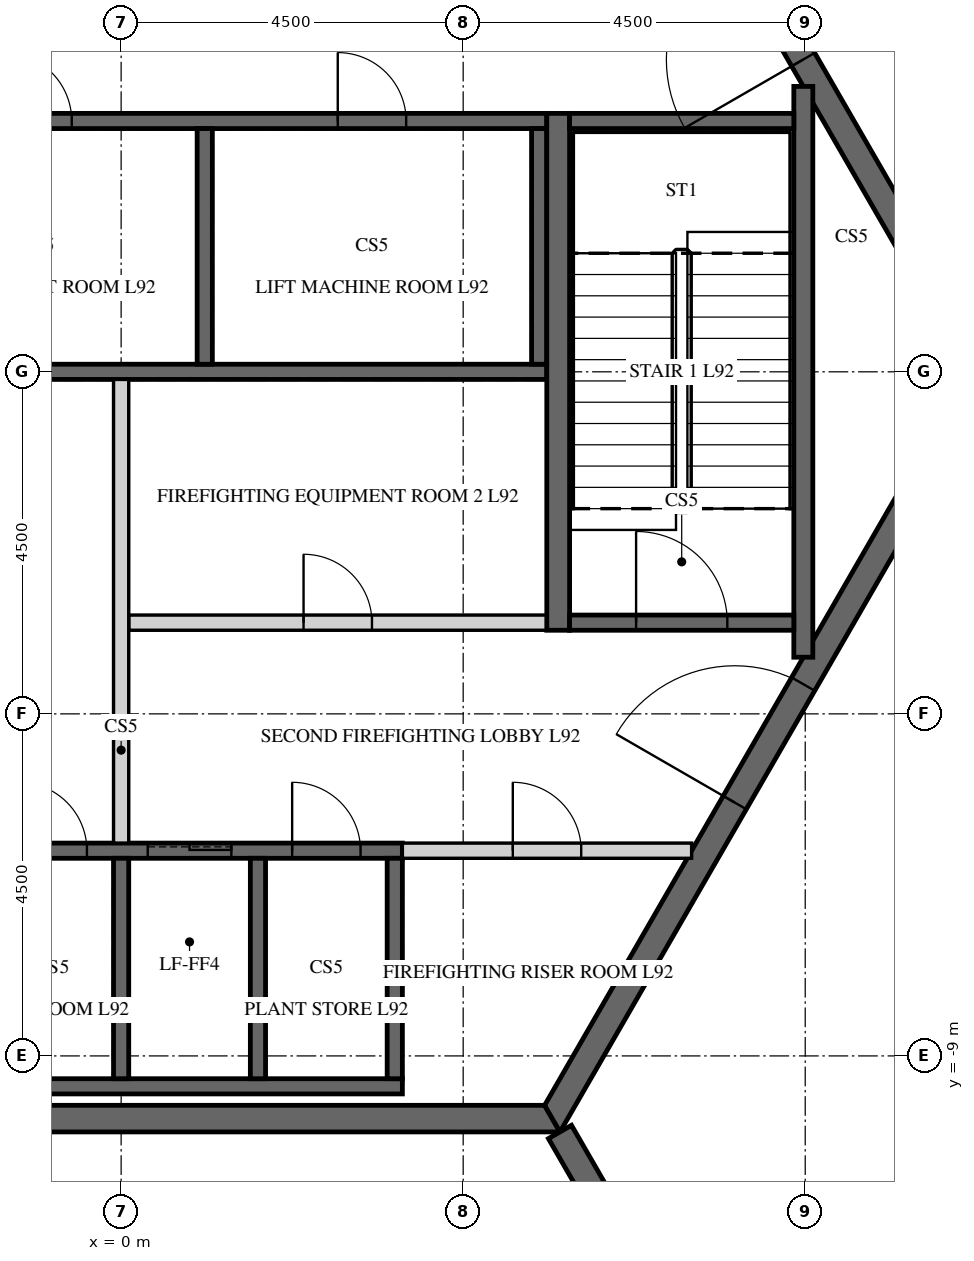
"""IFC4 building model, lengths in metres.
Left out: names, types, materials, properties, quantities, classifications, styles, units other than length and angle.
Written with IfcOpenShell. Run it as: python <this file> out.ifc"""

import sys

from ifc_helpers import new_model, si_unit, direction, frame, frame_2d, origin, place, context, subcontext, project, spatial, polyline, rectangle, outline, extrude, element, fill, save


model = new_model("IFC4")
c1 = context("Model", 3, precision=1e-05, world=origin(), true_north=direction((0.0, 1.0)))
c2 = subcontext(c1, "Body", "Model", "MODEL_VIEW")
j1 = project(units=[si_unit("LENGTHUNIT", "METRE"), si_unit("PLANEANGLEUNIT", "RADIAN")], contexts=[c1])
p1 = place(None, origin())
s1 = spatial("IfcSite", under=j1, at=p1, CompositionType="ELEMENT")
p2 = place(p1, origin())
s2 = spatial("IfcBuilding", under=s1, at=p2, CompositionType="ELEMENT")
p3 = place(p2, frame((0.0, 0.0, 388.2)))
s3 = spatial("IfcBuildingStorey", under=s2, at=p3, CompositionType="ELEMENT", Elevation=388.2)
p4 = place(p3, frame((-5.673, -9.825, -0.2), z_axis=(0.0, 0.0, 1.0), x_axis=(1.0, 0.0, 0.0)))
e1 = element("IfcWall", 1, at=p4, inside=s3, PredefinedType="SHEAR", context=c2, shape_type="SweptSolid", body=[
    extrude(outline(polyline([(-0.101, -0.175), (11.446, -0.175), (11.244, 0.175), (0.101, 0.175), (-0.101, -0.175)])), origin(), (0.0, 0.0, 1.0), 4.5),
])
p5 = place(p3, frame((5.673, -9.825, -0.2), z_axis=(0.0, 0.0, 1.0), x_axis=(0.499995046907, 0.866028263435, 0.0)))
e2 = element("IfcWall", 2, at=p5, inside=s3, PredefinedType="SHEAR", context=c2, shape_type="SweptSolid", body=[
    extrude(outline(polyline([(-0.101, -0.175), (11.446, -0.175), (11.244, 0.175), (0.101, 0.175), (-0.101, -0.175)])), origin(), (0.0, 0.0, 1.0), 4.5),
])
p6 = place(p5, frame((4.801, 0.0, 0.2)))
e3 = element("IfcOpeningElement", 3, at=p6, cuts=e2, PredefinedType="OPENING", context=c2, shape_type="SweptSolid", body=[
    extrude(rectangle(XDim=1.8, YDim=2.4, at=frame_2d((0.9, 1.2))), frame((0.0, 0.185, 0.0), z_axis=(0.0, -1.0, 0.0), x_axis=(1.0, 0.0, 0.0)), (0.0, 0.0, 1.0), 0.37),
])
p7 = place(p3, frame((11.345, 0.0, -0.2), z_axis=(0.0, 0.0, 1.0), x_axis=(-0.499995046907, 0.866028263435, 0.0)))
e4 = element("IfcWall", 4, at=p7, inside=s3, PredefinedType="SHEAR", context=c2, shape_type="SweptSolid", body=[
    extrude(outline(polyline([(-0.101, -0.175), (11.446, -0.175), (11.244, 0.175), (0.101, 0.175), (-0.101, -0.175)])), origin(), (0.0, 0.0, 1.0), 4.5),
])
p8 = place(p7, frame((4.744, 0.0, 0.2)))
e5 = element("IfcOpeningElement", 5, at=p8, cuts=e4, PredefinedType="OPENING", context=c2, shape_type="SweptSolid", body=[
    extrude(rectangle(XDim=1.8, YDim=2.4, at=frame_2d((0.9, 1.2))), frame((0.0, 0.185, 0.0), z_axis=(0.0, -1.0, 0.0), x_axis=(1.0, 0.0, 0.0)), (0.0, 0.0, 1.0), 0.37),
])
p9 = place(p3, frame((5.773, -10.0, -0.2), z_axis=(0.0, 0.0, 1.0), x_axis=(0.50001273609, -0.866018050475, 0.0)))
e6 = element("IfcWall", 6, at=p9, inside=s3, PredefinedType="SHEAR", context=c2, shape_type="SweptSolid", body=[
    extrude(rectangle(XDim=12.425, YDim=0.35, at=frame_2d((6.212, 0.0))), origin(), (0.0, 0.0, 1.0), 4.5),
])
p10 = place(p9, frame((5.312, 0.0, 0.2)))
e7 = element("IfcOpeningElement", 7, at=p10, cuts=e6, PredefinedType="OPENING", context=c2, shape_type="SweptSolid", body=[
    extrude(rectangle(XDim=1.8, YDim=2.4, at=frame_2d((0.9, 1.2))), frame((0.0, 0.185, 0.0), z_axis=(0.0, -1.0, 0.0), x_axis=(1.0, 0.0, 0.0)), (0.0, 0.0, 1.0), 0.37),
])
p11 = place(p3, frame((-5.6, 3.3, -0.2), z_axis=(0.0, 0.0, 1.0), x_axis=(1.0, 0.0, 0.0)))
e8 = element("IfcWall", 8, at=p11, inside=s3, PredefinedType="SHEAR", context=c2, shape_type="SweptSolid", body=[
    extrude(rectangle(XDim=11.2, YDim=0.2, at=frame_2d((5.6, 0.0))), origin(), (0.0, 0.0, 1.0), 4.5),
])
p12 = place(p11, frame((0.75, 0.0, 0.2)))
e9 = element("IfcOpeningElement", 9, at=p12, cuts=e8, PredefinedType="OPENING", context=c2, shape_type="SweptSolid", body=[
    extrude(rectangle(XDim=0.9, YDim=2.1, at=frame_2d((0.45, 1.05))), frame((0.0, 0.11, 0.0), z_axis=(0.0, -1.0, 0.0), x_axis=(1.0, 0.0, 0.0)), (0.0, 0.0, 1.0), 0.22),
])
p13 = place(p11, frame((4.05, 0.0, 0.2)))
e10 = element("IfcOpeningElement", 10, at=p13, cuts=e8, PredefinedType="OPENING", context=c2, shape_type="SweptSolid", body=[
    extrude(rectangle(XDim=0.9, YDim=2.1, at=frame_2d((0.45, 1.05))), frame((0.0, 0.11, 0.0), z_axis=(0.0, -1.0, 0.0), x_axis=(1.0, 0.0, 0.0)), (0.0, 0.0, 1.0), 0.22),
])
p14 = place(p11, frame((8.45, 0.0, 0.2)))
e11 = element("IfcOpeningElement", 11, at=p14, cuts=e8, PredefinedType="OPENING", context=c2, shape_type="SweptSolid", body=[
    extrude(rectangle(XDim=0.9, YDim=2.1, at=frame_2d((0.45, 1.05))), frame((0.0, 0.11, 0.0), z_axis=(0.0, -1.0, 0.0), x_axis=(1.0, 0.0, 0.0)), (0.0, 0.0, 1.0), 0.22),
])
p15 = place(p3, frame((-5.6, 0.0, -0.2), z_axis=(0.0, 0.0, 1.0), x_axis=(1.0, 0.0, 0.0)))
e12 = element("IfcWall", 12, at=p15, inside=s3, PredefinedType="SHEAR", context=c2, shape_type="SweptSolid", body=[
    extrude(rectangle(XDim=11.2, YDim=0.2, at=frame_2d((5.6, 0.0))), origin(), (0.0, 0.0, 1.0), 4.5),
])
for number, where, z_axis, x_axis in (
    (13, (1.1, 0.1, -0.2), (0.0, 0.0, 1.0), (0.0, 1.0, 0.0)),
    (14, (5.5, 0.1, -0.2), (0.0, 0.0, 1.0), (0.0, 1.0, 0.0)),
):
    element("IfcWall", number, at=place(p3, frame(where, z_axis=z_axis, x_axis=x_axis)), inside=s3, PredefinedType="SHEAR", context=c2, shape_type="SweptSolid", body=[
        extrude(rectangle(XDim=3.1, YDim=0.2, at=frame_2d((1.55, 0.0))), origin(), (0.0, 0.0, 1.0), 4.5),
    ])
p16 = place(p3, frame((-5.5, -6.3, -0.2), z_axis=(0.0, 0.0, 1.0), x_axis=(1.0, 0.0, 0.0)))
e15 = element("IfcWall", 15, at=p16, inside=s3, PredefinedType="SHEAR", context=c2, shape_type="SweptSolid", body=[
    extrude(rectangle(XDim=9.2, YDim=0.2, at=frame_2d((4.6, 0.0))), origin(), (0.0, 0.0, 1.0), 4.5),
])
p17 = place(p16, frame((4.15, 0.0, 0.2)))
e16 = element("IfcOpeningElement", 16, at=p17, cuts=e15, PredefinedType="OPENING", context=c2, shape_type="SweptSolid", body=[
    extrude(rectangle(XDim=0.9, YDim=2.1, at=frame_2d((0.45, 1.05))), frame((0.0, 0.11, 0.0), z_axis=(0.0, -1.0, 0.0), x_axis=(1.0, 0.0, 0.0)), (0.0, 0.0, 1.0), 0.22),
])
p18 = place(p16, frame((7.75, 0.0, 0.2)))
e17 = element("IfcOpeningElement", 17, at=p18, cuts=e15, PredefinedType="OPENING", context=c2, shape_type="SweptSolid", body=[
    extrude(rectangle(XDim=0.9, YDim=2.1, at=frame_2d((0.45, 1.05))), frame((0.0, 0.11, 0.0), z_axis=(0.0, -1.0, 0.0), x_axis=(1.0, 0.0, 0.0)), (0.0, 0.0, 1.0), 0.22),
])
p19 = place(p16, frame((0.45, 0.0, 0.2)))
e18 = element("IfcOpeningElement", 18, at=p19, cuts=e15, PredefinedType="OPENING", context=c2, shape_type="SweptSolid", body=[
    extrude(rectangle(XDim=1.1, YDim=2.1, at=frame_2d((0.55, 1.05))), frame((0.0, 0.11, 0.0), z_axis=(0.0, -1.0, 0.0), x_axis=(1.0, 0.0, 0.0)), (0.0, 0.0, 1.0), 0.22),
])
p20 = place(p16, frame((2.25, 0.0, 0.2)))
e19 = element("IfcOpeningElement", 19, at=p20, cuts=e15, PredefinedType="OPENING", context=c2, shape_type="SweptSolid", body=[
    extrude(rectangle(XDim=1.1, YDim=2.1, at=frame_2d((0.55, 1.05))), frame((0.0, 0.11, 0.0), z_axis=(0.0, -1.0, 0.0), x_axis=(1.0, 0.0, 0.0)), (0.0, 0.0, 1.0), 0.22),
])
p21 = place(p16, frame((5.85, 0.0, 0.2)))
e20 = element("IfcOpeningElement", 20, at=p21, cuts=e15, PredefinedType="OPENING", context=c2, shape_type="SweptSolid", body=[
    extrude(rectangle(XDim=1.1, YDim=2.1, at=frame_2d((0.55, 1.05))), frame((0.0, 0.11, 0.0), z_axis=(0.0, -1.0, 0.0), x_axis=(1.0, 0.0, 0.0)), (0.0, 0.0, 1.0), 0.22),
])
p22 = place(p3, frame((-5.5, -9.4, -0.2), z_axis=(0.0, 0.0, 1.0), x_axis=(1.0, 0.0, 0.0)))
e21 = element("IfcWall", 21, at=p22, inside=s3, PredefinedType="SHEAR", context=c2, shape_type="SweptSolid", body=[
    extrude(rectangle(XDim=9.2, YDim=0.2, at=frame_2d((4.6, 0.0))), origin(), (0.0, 0.0, 1.0), 4.5),
])
for number, where, z_axis, x_axis in (
    (22, (0.0, -9.3, -0.2), (0.0, 0.0, 1.0), (0.0, 1.0, 0.0)),
    (23, (1.8, -9.3, -0.2), (0.0, 0.0, 1.0), (0.0, 1.0, 0.0)),
    (24, (3.6, -9.3, -0.2), (0.0, 0.0, 1.0), (0.0, 1.0, 0.0)),
):
    element("IfcWall", number, at=place(p3, frame(where, z_axis=z_axis, x_axis=x_axis)), inside=s3, PredefinedType="SHEAR", context=c2, shape_type="SweptSolid", body=[
        extrude(rectangle(XDim=2.9, YDim=0.2, at=frame_2d((1.45, 0.0))), origin(), (0.0, 0.0, 1.0), 4.5),
    ])
p23 = place(p3, frame((0.1, -3.3, 0.0), z_axis=(0.0, 0.0, 1.0), x_axis=(1.0, 0.0, 0.0)))
e25 = element("IfcWall", 25, at=p23, inside=s3, PredefinedType="PARTITIONING", context=c2, shape_type="SweptSolid", body=[
    extrude(rectangle(XDim=5.5, YDim=0.2, at=frame_2d((2.75, 0.0))), origin(), (0.0, 0.0, 1.0), 4.3),
])
p24 = place(p23, frame((2.3, 0.0, 0.0)))
e26 = element("IfcOpeningElement", 26, at=p24, cuts=e25, PredefinedType="OPENING", context=c2, shape_type="SweptSolid", body=[
    extrude(rectangle(XDim=0.9, YDim=2.1, at=frame_2d((0.45, 1.05))), frame((0.0, 0.11, 0.0), z_axis=(0.0, -1.0, 0.0), x_axis=(1.0, 0.0, 0.0)), (0.0, 0.0, 1.0), 0.22),
])
p25 = place(p3, frame((0.0, -6.2, 0.0), z_axis=(0.0, 0.0, 1.0), x_axis=(0.0, 1.0, 0.0)))
e27 = element("IfcWall", 27, at=p25, inside=s3, PredefinedType="PARTITIONING", context=c2, shape_type="SweptSolid", body=[
    extrude(rectangle(XDim=6.1, YDim=0.2, at=frame_2d((3.05, 0.0))), origin(), (0.0, 0.0, 1.0), 4.3),
])
p26 = place(p3, frame((3.7, -6.3, 0.0), z_axis=(0.0, 0.0, 1.0), x_axis=(1.0, 0.0, 0.0)))
e28 = element("IfcWall", 28, at=p26, inside=s3, PredefinedType="PARTITIONING", context=c2, shape_type="SweptSolid", body=[
    extrude(rectangle(XDim=3.806, YDim=0.2, at=frame_2d((1.903, 0.0))), origin(), (0.0, 0.0, 1.0), 4.3),
])
p27 = place(p26, frame((1.453, 0.0, 0.0)))
e29 = element("IfcOpeningElement", 29, at=p27, cuts=e28, PredefinedType="OPENING", context=c2, shape_type="SweptSolid", body=[
    extrude(rectangle(XDim=0.9, YDim=2.1, at=frame_2d((0.45, 1.05))), frame((0.0, 0.11, 0.0), z_axis=(0.0, -1.0, 0.0), x_axis=(1.0, 0.0, 0.0)), (0.0, 0.0, 1.0), 0.22),
])
p28 = place(p3, frame((5.75, -3.4, -0.2), z_axis=(0.0, 0.0, 1.0), x_axis=(0.0, 1.0, 0.0)))
e30 = element("IfcWall", 30, at=p28, inside=s3, PredefinedType="SHEAR", context=c2, shape_type="SweptSolid", body=[
    extrude(rectangle(XDim=6.8, YDim=0.3, at=frame_2d((3.4, 0.0))), origin(), (0.0, 0.0, 1.0), 4.5),
])
p29 = place(p3, frame((8.975, -3.755, -0.2), z_axis=(0.0, 0.0, 1.0), x_axis=(0.0, 1.0, 0.0)))
e31 = element("IfcWall", 31, at=p29, inside=s3, PredefinedType="SHEAR", context=c2, shape_type="SweptSolid", body=[
    extrude(rectangle(XDim=7.51, YDim=0.25, at=frame_2d((3.755, 0.0))), origin(), (0.0, 0.0, 1.0), 4.5),
])
p30 = place(p3, frame((5.9, 3.3, -0.2), z_axis=(0.0, 0.0, 1.0), x_axis=(1.0, 0.0, 0.0)))
e32 = element("IfcWall", 32, at=p30, inside=s3, PredefinedType="SHEAR", context=c2, shape_type="SweptSolid", body=[
    extrude(rectangle(XDim=2.95, YDim=0.2, at=frame_2d((1.475, 0.0))), origin(), (0.0, 0.0, 1.0), 4.5),
])
p31 = place(p3, frame((5.9, -3.3, -0.2), z_axis=(0.0, 0.0, 1.0), x_axis=(1.0, 0.0, 0.0)))
e33 = element("IfcWall", 33, at=p31, inside=s3, PredefinedType="SHEAR", context=c2, shape_type="SweptSolid", body=[
    extrude(rectangle(XDim=2.95, YDim=0.2, at=frame_2d((1.475, 0.0))), origin(), (0.0, 0.0, 1.0), 4.5),
])
p32 = place(p31, frame((0.875, 0.0, 0.2)))
e34 = element("IfcOpeningElement", 34, at=p32, cuts=e33, PredefinedType="OPENING", context=c2, shape_type="SweptSolid", body=[
    extrude(rectangle(XDim=1.2, YDim=2.4, at=frame_2d((0.6, 1.2))), frame((0.0, 0.11, 0.0), z_axis=(0.0, -1.0, 0.0), x_axis=(1.0, 0.0, 0.0)), (0.0, 0.0, 1.0), 0.22),
])
p33 = place(p3, frame((9.546, -16.185, 0.0), z_axis=(0.0, 0.0, 1.0), x_axis=(0.500030775662, 0.866007634718, 0.0)))
e35 = element("IfcWall", 35, at=p33, inside=s3, PredefinedType="PARTITIONING", context=c2, shape_type="SweptSolid", body=[
    extrude(rectangle(XDim=18.689, YDim=0.2, at=frame_2d((9.345, 0.0))), origin(), (0.0, 0.0, 1.0), 3.692),
])
p34 = place(p33, frame((8.745, 0.0, 0.0)))
e36 = element("IfcOpeningElement", 36, at=p34, cuts=e35, PredefinedType="OPENING", context=c2, shape_type="SweptSolid", body=[
    extrude(rectangle(XDim=1.2, YDim=2.1, at=frame_2d((0.6, 1.05))), frame((0.0, 0.11, 0.0), z_axis=(0.0, -1.0, 0.0), x_axis=(1.0, 0.0, 0.0)), (0.0, 0.0, 1.0), 0.22),
])
p35 = place(p3, frame((18.833, 0.1, 0.0), z_axis=(0.0, 0.0, 1.0), x_axis=(-0.500028143963, 0.86600915425, 0.0)))
e37 = element("IfcWall", 37, at=p35, inside=s3, PredefinedType="PARTITIONING", context=c2, shape_type="SweptSolid", body=[
    extrude(rectangle(XDim=18.574, YDim=0.2, at=frame_2d((9.287, 0.0))), origin(), (0.0, 0.0, 1.0), 3.692),
])
p36 = place(p8, origin())
e38 = element("IfcDoor", 38, at=p36, inside=s3, OperationType="DOUBLE_DOOR_SINGLE_SWING", PredefinedType="DOOR", context=c2, shape_type="SweptSolid", body=[
    extrude(rectangle(XDim=1.8, YDim=2.4, at=frame_2d((0.9, 1.2))), frame((0.0, 0.025, 0.0), z_axis=(0.0, -1.0, 0.0), x_axis=(1.0, 0.0, 0.0)), (0.0, 0.0, 1.0), 0.05),
])
fill(e5, e38)
p37 = place(p6, origin())
e39 = element("IfcDoor", 39, at=p37, inside=s3, OperationType="DOUBLE_DOOR_SINGLE_SWING", PredefinedType="DOOR", context=c2, shape_type="SweptSolid", body=[
    extrude(rectangle(XDim=1.8, YDim=2.4, at=frame_2d((0.9, 1.2))), frame((0.0, 0.025, 0.0), z_axis=(0.0, -1.0, 0.0), x_axis=(1.0, 0.0, 0.0)), (0.0, 0.0, 1.0), 0.05),
])
fill(e3, e39)
p38 = place(p24, origin())
e40 = element("IfcDoor", 40, at=p38, inside=s3, OperationType="SINGLE_SWING_LEFT", PredefinedType="DOOR", context=c2, shape_type="SweptSolid", body=[
    extrude(rectangle(XDim=0.9, YDim=2.1, at=frame_2d((0.45, 1.05))), frame((0.0, 0.025, 0.0), z_axis=(0.0, -1.0, 0.0), x_axis=(1.0, 0.0, 0.0)), (0.0, 0.0, 1.0), 0.05),
])
fill(e26, e40)
p39 = place(p27, origin())
e41 = element("IfcDoor", 41, at=p39, inside=s3, OperationType="SINGLE_SWING_LEFT", PredefinedType="DOOR", context=c2, shape_type="SweptSolid", body=[
    extrude(rectangle(XDim=0.9, YDim=2.1, at=frame_2d((0.45, 1.05))), frame((0.0, 0.025, 0.0), z_axis=(0.0, -1.0, 0.0), x_axis=(1.0, 0.0, 0.0)), (0.0, 0.0, 1.0), 0.05),
])
fill(e29, e41)
p40 = place(p13, origin())
e42 = element("IfcDoor", 42, at=p40, inside=s3, OperationType="SINGLE_SWING_LEFT", PredefinedType="DOOR", context=c2, shape_type="SweptSolid", body=[
    extrude(rectangle(XDim=0.9, YDim=2.1, at=frame_2d((0.45, 1.05))), frame((0.0, 0.025, 0.0), z_axis=(0.0, -1.0, 0.0), x_axis=(1.0, 0.0, 0.0)), (0.0, 0.0, 1.0), 0.05),
])
fill(e10, e42)
p41 = place(p14, origin())
e43 = element("IfcDoor", 43, at=p41, inside=s3, OperationType="SINGLE_SWING_LEFT", PredefinedType="DOOR", context=c2, shape_type="SweptSolid", body=[
    extrude(rectangle(XDim=0.9, YDim=2.1, at=frame_2d((0.45, 1.05))), frame((0.0, 0.025, 0.0), z_axis=(0.0, -1.0, 0.0), x_axis=(1.0, 0.0, 0.0)), (0.0, 0.0, 1.0), 0.05),
])
fill(e11, e43)
p42 = place(p17, origin())
e44 = element("IfcDoor", 44, at=p42, inside=s3, OperationType="SINGLE_SWING_LEFT", PredefinedType="DOOR", context=c2, shape_type="SweptSolid", body=[
    extrude(rectangle(XDim=0.9, YDim=2.1, at=frame_2d((0.45, 1.05))), frame((0.0, 0.025, 0.0), z_axis=(0.0, -1.0, 0.0), x_axis=(1.0, 0.0, 0.0)), (0.0, 0.0, 1.0), 0.05),
])
fill(e16, e44)
p43 = place(p18, origin())
e45 = element("IfcDoor", 45, at=p43, inside=s3, OperationType="SINGLE_SWING_LEFT", PredefinedType="DOOR", context=c2, shape_type="SweptSolid", body=[
    extrude(rectangle(XDim=0.9, YDim=2.1, at=frame_2d((0.45, 1.05))), frame((0.0, 0.025, 0.0), z_axis=(0.0, -1.0, 0.0), x_axis=(1.0, 0.0, 0.0)), (0.0, 0.0, 1.0), 0.05),
])
fill(e17, e45)
p44 = place(p32, origin())
e46 = element("IfcDoor", 46, at=p44, inside=s3, OperationType="SINGLE_SWING_LEFT", PredefinedType="DOOR", context=c2, shape_type="SweptSolid", body=[
    extrude(rectangle(XDim=1.2, YDim=2.4, at=frame_2d((0.6, 1.2))), frame((0.0, 0.025, 0.0), z_axis=(0.0, -1.0, 0.0), x_axis=(1.0, 0.0, 0.0)), (0.0, 0.0, 1.0), 0.05),
])
fill(e34, e46)
p45 = place(p21, origin())
e47 = element("IfcDoor", 47, at=p45, inside=s3, OperationType="SLIDING_TO_LEFT", PredefinedType="DOOR", context=c2, shape_type="SweptSolid", body=[
    extrude(rectangle(XDim=1.1, YDim=2.1, at=frame_2d((0.55, 1.05))), frame((0.0, 0.025, 0.0), z_axis=(0.0, -1.0, 0.0), x_axis=(1.0, 0.0, 0.0)), (0.0, 0.0, 1.0), 0.05),
])
fill(e20, e47)
save(model, sys.argv[1])
